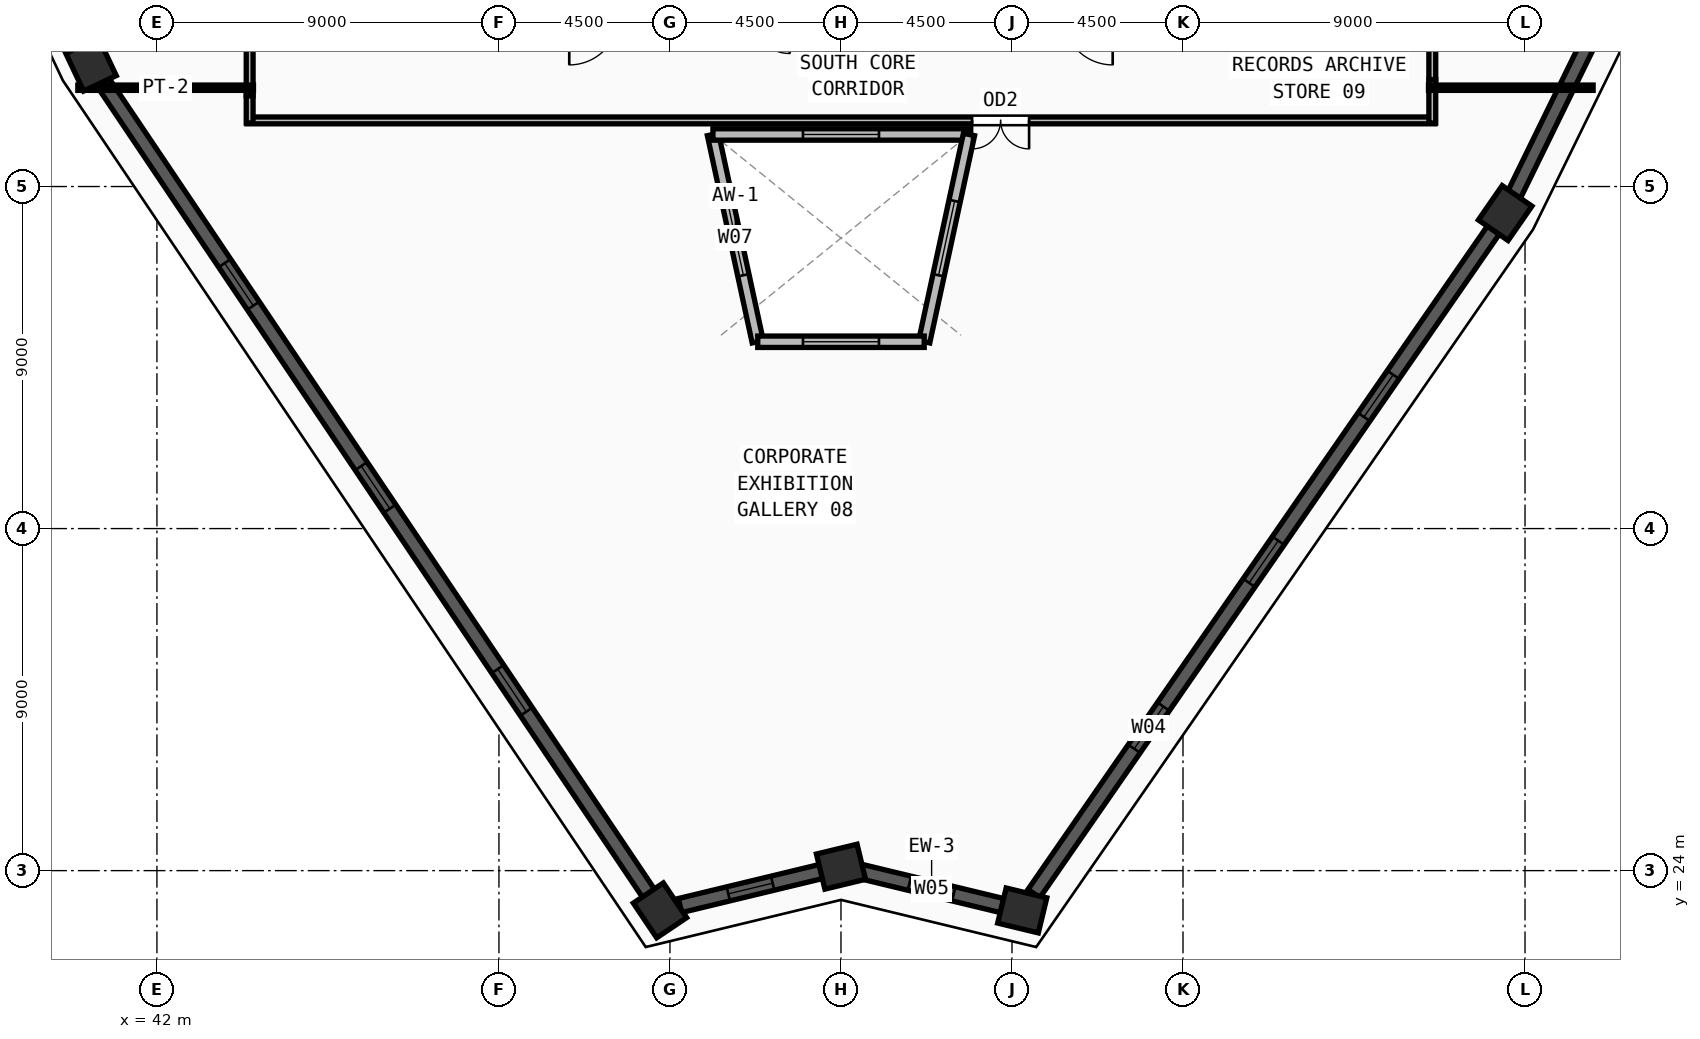
"""IFC4 building model, lengths in metres.
Left out: names, types, materials, properties, quantities, classifications, styles, units other than length and angle.
Written with IfcOpenShell. Run it as: python <this file> out.ifc"""

import sys

from ifc_helpers import new_model, si_unit, direction, frame, frame_2d, origin, origin_2d, place, context, subcontext, project, spatial, rectangle, extrude, source, transform, mapped, element, fill, save


model = new_model("IFC4")
c1 = context("Model", 3, precision=1e-05, world=origin(), true_north=direction((0.0, 1.0)))
c2 = subcontext(c1, "Body", "Model", "MODEL_VIEW")
j1 = project(units=[si_unit("LENGTHUNIT", "METRE"), si_unit("PLANEANGLEUNIT", "RADIAN")], contexts=[c1])
p1 = place(None, origin())
s1 = spatial("IfcSite", under=j1, at=p1, CompositionType="ELEMENT")
p2 = place(p1, origin())
s2 = spatial("IfcBuilding", under=s1, at=p2, CompositionType="ELEMENT")
p3 = place(p2, frame((0.0, 0.0, 328.5)))
s3 = spatial("IfcBuildingStorey", under=s2, at=p3, CompositionType="ELEMENT", Elevation=328.5)
m1 = source(origin(), c2, "Body", "SweptSolid", [
    extrude(rectangle(XDim=1.1, YDim=0.95, at=origin_2d()), origin(), (0.0, 0.0, 1.0), 3.75),
])
for number, where, z_axis, x_axis in (
    (1, (55.238, 22.954, 0.0), (0.0, 0.0, 1.0), (-0.558, 0.83, 0.0)),
    (2, (40.265, 45.213, 0.0), (0.0, 0.0, 1.0), (-0.427, 0.904, 0.0)),
    (3, (77.477, 41.302, 0.0), (0.0, 0.0, 1.0), (0.569, 0.822, 0.0)),
    (4, (64.77, 22.952, 0.0), (0.0, 0.0, 1.0), (-0.972, 0.235, 0.0)),
    (5, (60.0, 24.104, 0.0), (0.0, 0.0, 1.0), (0.972, 0.235, 0.0)),
):
    element("IfcColumn", number, at=place(p3, frame(where, z_axis=z_axis, x_axis=x_axis)), inside=s3, PredefinedType="COLUMN", context=c2, shape_type="MappedRepresentation", body=[
        mapped(m1, transform((0.0, 0.0, 0.0), x_axis=(1.0, 0.0, 0.0), y_axis=(0.0, 1.0, 0.0), z_axis=(0.0, 0.0, 1.0), scale=1.0)),
    ])
p4 = place(p3, frame((60.525, 23.977, 0.0), z_axis=(0.0, 0.0, 1.0), x_axis=(0.972084215522, -0.234632218447, 0.0)))
e6 = element("IfcWall", 6, at=p4, inside=s3, PredefinedType="SOLIDWALL", context=c2, shape_type="SweptSolid", body=[
    extrude(rectangle(XDim=3.827, YDim=0.38, at=frame_2d((1.914, 0.0))), origin(), (0.0, 0.0, 1.0), 3.57),
])
m2 = source(origin(), c2, "Body", "SweptSolid", [
    extrude(rectangle(XDim=1.2, YDim=1.9, at=frame_2d((0.6, 0.95))), frame((0.0, 0.2, 0.0), z_axis=(0.0, -1.0, 0.0), x_axis=(1.0, 0.0, 0.0)), (0.0, 0.0, 1.0), 0.4),
])
p5 = place(p4, frame((1.313, 0.0, 0.55)))
e7 = element("IfcOpeningElement", 7, at=p5, cuts=e6, PredefinedType="OPENING", context=c2, shape_type="MappedRepresentation", body=[
    mapped(m2, transform((0.0, 0.0, 0.0), x_axis=(1.0, 0.0, 0.0), y_axis=(0.0, 1.0, 0.0), z_axis=(0.0, 0.0, 1.0), scale=1.0)),
])
p6 = place(p3, frame((65.077, 23.396, 0.0), z_axis=(0.0, 0.0, 1.0), x_axis=(0.569337280664, 0.822104045025, 0.0)))
e8 = element("IfcWall", 8, at=p6, inside=s3, PredefinedType="SOLIDWALL", context=c2, shape_type="SweptSolid", body=[
    extrude(rectangle(XDim=21.24, YDim=0.38, at=frame_2d((10.62, 0.0))), origin(), (0.0, 0.0, 1.0), 3.57),
])
m3 = source(origin(), c2, "Body", "SweptSolid", [
    extrude(rectangle(XDim=1.35, YDim=1.85, at=frame_2d((0.675, 0.925))), frame((0.0, 0.2, 0.0), z_axis=(0.0, -1.0, 0.0), x_axis=(1.0, 0.0, 0.0)), (0.0, 0.0, 1.0), 0.4),
])
p7 = place(p6, frame((4.635, 0.0, 0.55)))
e9 = element("IfcOpeningElement", 9, at=p7, cuts=e8, PredefinedType="OPENING", context=c2, shape_type="MappedRepresentation", body=[
    mapped(m3, transform((0.0, 0.0, 0.0), x_axis=(1.0, 0.0, 0.0), y_axis=(0.0, 1.0, 0.0), z_axis=(0.0, 0.0, 1.0), scale=1.0)),
])
p8 = place(p6, frame((9.945, 0.0, 0.55)))
e10 = element("IfcOpeningElement", 10, at=p8, cuts=e8, PredefinedType="OPENING", context=c2, shape_type="MappedRepresentation", body=[
    mapped(m3, transform((0.0, 0.0, 0.0), x_axis=(1.0, 0.0, 0.0), y_axis=(0.0, 1.0, 0.0), z_axis=(0.0, 0.0, 1.0), scale=1.0)),
])
p9 = place(p6, frame((15.255, 0.0, 0.55)))
e11 = element("IfcOpeningElement", 11, at=p9, cuts=e8, PredefinedType="OPENING", context=c2, shape_type="MappedRepresentation", body=[
    mapped(m3, transform((0.0, 0.0, 0.0), x_axis=(1.0, 0.0, 0.0), y_axis=(0.0, 1.0, 0.0), z_axis=(0.0, 0.0, 1.0), scale=1.0)),
])
p10 = place(p3, frame((77.714, 41.787, 0.0), z_axis=(0.0, 0.0, 1.0), x_axis=(0.439535610403, 0.898225165083, 0.0)))
e12 = element("IfcWall", 12, at=p10, inside=s3, PredefinedType="SOLIDWALL", context=c2, shape_type="SweptSolid", body=[
    extrude(rectangle(XDim=25.747, YDim=0.38, at=frame_2d((12.874, 0.0))), origin(), (0.0, 0.0, 1.0), 3.57),
])
p11 = place(p10, frame((4.912, 0.0, 0.55)))
e13 = element("IfcOpeningElement", 13, at=p11, cuts=e12, PredefinedType="OPENING", context=c2, shape_type="MappedRepresentation", body=[
    mapped(m3, transform((0.0, 0.0, 0.0), x_axis=(1.0, 0.0, 0.0), y_axis=(0.0, 1.0, 0.0), z_axis=(0.0, 0.0, 1.0), scale=1.0)),
])
p12 = place(p10, frame((12.199, 0.0, 0.55)))
e14 = element("IfcOpeningElement", 14, at=p12, cuts=e12, PredefinedType="OPENING", context=c2, shape_type="MappedRepresentation", body=[
    mapped(m3, transform((0.0, 0.0, 0.0), x_axis=(1.0, 0.0, 0.0), y_axis=(0.0, 1.0, 0.0), z_axis=(0.0, 0.0, 1.0), scale=1.0)),
])
p13 = place(p10, frame((18.636, 0.0, 0.55)))
e15 = element("IfcOpeningElement", 15, at=p13, cuts=e12, PredefinedType="OPENING", context=c2, shape_type="MappedRepresentation", body=[
    mapped(m3, transform((0.0, 0.0, 0.0), x_axis=(1.0, 0.0, 0.0), y_axis=(0.0, 1.0, 0.0), z_axis=(0.0, 0.0, 1.0), scale=1.0)),
])
p14 = place(p3, frame((40.566, 44.765, 0.0), z_axis=(0.0, 0.0, 1.0), x_axis=(0.558170282959, -0.829726421913, 0.0)))
e16 = element("IfcWall", 16, at=p14, inside=s3, PredefinedType="SOLIDWALL", context=c2, shape_type="SweptSolid", body=[
    extrude(rectangle(XDim=25.747, YDim=0.38, at=frame_2d((12.874, 0.0))), origin(), (0.0, 0.0, 1.0), 3.57),
])
p15 = place(p14, frame((5.762, 0.0, 0.55)))
e17 = element("IfcOpeningElement", 17, at=p15, cuts=e16, PredefinedType="OPENING", context=c2, shape_type="MappedRepresentation", body=[
    mapped(m3, transform((0.0, 0.0, 0.0), x_axis=(1.0, 0.0, 0.0), y_axis=(0.0, 1.0, 0.0), z_axis=(0.0, 0.0, 1.0), scale=1.0)),
])
p16 = place(p14, frame((12.198, 0.0, 0.55)))
e18 = element("IfcOpeningElement", 18, at=p16, cuts=e16, PredefinedType="OPENING", context=c2, shape_type="MappedRepresentation", body=[
    mapped(m3, transform((0.0, 0.0, 0.0), x_axis=(1.0, 0.0, 0.0), y_axis=(0.0, 1.0, 0.0), z_axis=(0.0, 0.0, 1.0), scale=1.0)),
])
p17 = place(p14, frame((18.635, 0.0, 0.55)))
e19 = element("IfcOpeningElement", 19, at=p17, cuts=e16, PredefinedType="OPENING", context=c2, shape_type="MappedRepresentation", body=[
    mapped(m3, transform((0.0, 0.0, 0.0), x_axis=(1.0, 0.0, 0.0), y_axis=(0.0, 1.0, 0.0), z_axis=(0.0, 0.0, 1.0), scale=1.0)),
])
p18 = place(p3, frame((55.763, 23.081, 0.0), z_axis=(0.0, 0.0, 1.0), x_axis=(0.972084722694, 0.234630117217, 0.0)))
e20 = element("IfcWall", 20, at=p18, inside=s3, PredefinedType="SOLIDWALL", context=c2, shape_type="SweptSolid", body=[
    extrude(rectangle(XDim=3.819, YDim=0.38, at=frame_2d((1.909, 0.0))), origin(), (0.0, 0.0, 1.0), 3.57),
])
p19 = place(p18, frame((1.309, 0.0, 0.55)))
e21 = element("IfcOpeningElement", 21, at=p19, cuts=e20, PredefinedType="OPENING", context=c2, shape_type="MappedRepresentation", body=[
    mapped(m2, transform((0.0, 0.0, 0.0), x_axis=(1.0, 0.0, 0.0), y_axis=(0.0, 1.0, 0.0), z_axis=(0.0, 0.0, 1.0), scale=1.0)),
])
p20 = place(p3, frame((57.81, 37.916, 0.0), z_axis=(0.0, 0.0, 1.0), x_axis=(-0.211279697176, 0.977425644006, 0.0)))
e22 = element("IfcWall", 22, at=p20, inside=s3, PredefinedType="SOLIDWALL", context=c2, shape_type="SweptSolid", body=[
    extrude(rectangle(XDim=5.58, YDim=0.3, at=frame_2d((2.79, 0.0))), origin(), (0.0, 0.0, 1.0), 3.57),
])
m4 = source(origin(), c2, "Body", "SweptSolid", [
    extrude(rectangle(XDim=2.0, YDim=1.9, at=frame_2d((1.0, 0.95))), frame((0.0, 0.16, 0.0), z_axis=(0.0, -1.0, 0.0), x_axis=(1.0, 0.0, 0.0)), (0.0, 0.0, 1.0), 0.32),
])
p21 = place(p20, frame((1.79, 0.0, 0.55)))
e23 = element("IfcOpeningElement", 23, at=p21, cuts=e22, PredefinedType="OPENING", context=c2, shape_type="MappedRepresentation", body=[
    mapped(m4, transform((0.0, 0.0, 0.0), x_axis=(1.0, 0.0, 0.0), y_axis=(0.0, 1.0, 0.0), z_axis=(0.0, 0.0, 1.0), scale=1.0)),
])
p22 = place(p3, frame((56.631, 43.37, 0.0), z_axis=(0.0, 0.0, 1.0), x_axis=(1.0, 0.0, 0.0)))
e24 = element("IfcWall", 24, at=p22, inside=s3, PredefinedType="SOLIDWALL", context=c2, shape_type="SweptSolid", body=[
    extrude(rectangle(XDim=6.738, YDim=0.3, at=frame_2d((3.369, 0.0))), origin(), (0.0, 0.0, 1.0), 3.57),
])
p23 = place(p22, frame((2.369, 0.0, 0.55)))
e25 = element("IfcOpeningElement", 25, at=p23, cuts=e24, PredefinedType="OPENING", context=c2, shape_type="MappedRepresentation", body=[
    mapped(m4, transform((0.0, 0.0, 0.0), x_axis=(1.0, 0.0, 0.0), y_axis=(0.0, 1.0, 0.0), z_axis=(0.0, 0.0, 1.0), scale=1.0)),
])
p24 = place(p3, frame((63.369, 43.37, 0.0), z_axis=(0.0, 0.0, 1.0), x_axis=(-0.211279697176, -0.977425644006, 0.0)))
e26 = element("IfcWall", 26, at=p24, inside=s3, PredefinedType="SOLIDWALL", context=c2, shape_type="SweptSolid", body=[
    extrude(rectangle(XDim=5.58, YDim=0.3, at=frame_2d((2.79, 0.0))), origin(), (0.0, 0.0, 1.0), 3.57),
])
p25 = place(p24, frame((1.79, 0.0, 0.55)))
e27 = element("IfcOpeningElement", 27, at=p25, cuts=e26, PredefinedType="OPENING", context=c2, shape_type="MappedRepresentation", body=[
    mapped(m4, transform((0.0, 0.0, 0.0), x_axis=(1.0, 0.0, 0.0), y_axis=(0.0, 1.0, 0.0), z_axis=(0.0, 0.0, 1.0), scale=1.0)),
])
p26 = place(p3, frame((62.19, 37.916, 0.0), z_axis=(0.0, 0.0, 1.0), x_axis=(-1.0, 0.0, 0.0)))
e28 = element("IfcWall", 28, at=p26, inside=s3, PredefinedType="SOLIDWALL", context=c2, shape_type="SweptSolid", body=[
    extrude(rectangle(XDim=4.38, YDim=0.3, at=frame_2d((2.19, 0.0))), origin(), (0.0, 0.0, 1.0), 3.57),
])
p27 = place(p26, frame((1.19, 0.0, 0.55)))
e29 = element("IfcOpeningElement", 29, at=p27, cuts=e28, PredefinedType="OPENING", context=c2, shape_type="MappedRepresentation", body=[
    mapped(m4, transform((0.0, 0.0, 0.0), x_axis=(1.0, 0.0, 0.0), y_axis=(0.0, 1.0, 0.0), z_axis=(0.0, 0.0, 1.0), scale=1.0)),
])
p28 = place(p3, frame((75.63, 43.74, 0.0), z_axis=(0.0, 0.0, 1.0), x_axis=(-1.0, 0.0, 0.0)))
e30 = element("IfcWall", 30, at=p28, inside=s3, PredefinedType="PARTITIONING", context=c2, shape_type="SweptSolid", body=[
    extrude(rectangle(XDim=31.26, YDim=0.18, at=frame_2d((15.63, 0.0))), origin(), (0.0, 0.0, 1.0), 3.57),
])
m5 = source(origin(), c2, "Body", "SweptSolid", [
    extrude(rectangle(XDim=1.5, YDim=2.2, at=frame_2d((0.75, 1.1))), frame((0.0, 0.1, 0.0), z_axis=(0.0, -1.0, 0.0), x_axis=(1.0, 0.0, 0.0)), (0.0, 0.0, 1.0), 0.2),
])
p29 = place(p28, frame((10.68, 0.0, 0.0)))
e31 = element("IfcOpeningElement", 31, at=p29, cuts=e30, PredefinedType="OPENING", context=c2, shape_type="MappedRepresentation", body=[
    mapped(m5, transform((0.0, 0.0, 0.0), x_axis=(1.0, 0.0, 0.0), y_axis=(0.0, 1.0, 0.0), z_axis=(0.0, 0.0, 1.0), scale=1.0)),
])
p30 = place(p3, frame((44.44, 44.385, 0.0), z_axis=(0.0, 0.0, 1.0), x_axis=(0.0, 1.0, 0.0)))
e32 = element("IfcWall", 32, at=p30, inside=s3, PredefinedType="PARTITIONING", context=c2, shape_type="SweptSolid", body=[
    extrude(rectangle(XDim=2.955, YDim=0.18, at=frame_2d((1.478, 0.0))), origin(), (0.0, 0.0, 1.0), 3.57),
])
p31 = place(p3, frame((44.44, 43.67, 0.0), z_axis=(0.0, 0.0, 1.0), x_axis=(0.0, 1.0, 0.0)))
e33 = element("IfcWall", 33, at=p31, inside=s3, PredefinedType="PARTITIONING", context=c2, shape_type="SweptSolid", body=[
    extrude(rectangle(XDim=0.715, YDim=0.18, at=frame_2d((0.357, 0.0))), origin(), (0.0, 0.0, 1.0), 3.57),
])
p32 = place(p3, frame((75.56, 44.815, 0.0), z_axis=(0.0, 0.0, 1.0), x_axis=(0.0, -1.0, 0.0)))
e34 = element("IfcWall", 34, at=p32, inside=s3, PredefinedType="PARTITIONING", context=c2, shape_type="SweptSolid", body=[
    extrude(rectangle(XDim=1.145, YDim=0.18, at=frame_2d((0.573, 0.0))), origin(), (0.0, 0.0, 1.0), 3.57),
])
p33 = place(p3, frame((75.56, 48.21, 0.0), z_axis=(0.0, 0.0, 1.0), x_axis=(0.0, -1.0, 0.0)))
e35 = element("IfcWall", 35, at=p33, inside=s3, PredefinedType="PARTITIONING", context=c2, shape_type="SweptSolid", body=[
    extrude(rectangle(XDim=3.395, YDim=0.18, at=frame_2d((1.698, 0.0))), origin(), (0.0, 0.0, 1.0), 3.57),
])
p34 = place(p3, frame((44.54, 44.6, 0.0), z_axis=(0.0, 0.0, 1.0), x_axis=(-1.0, 0.0, 0.0)))
e36 = element("IfcWall", 36, at=p34, inside=s3, PredefinedType="PARTITIONING", context=c2, shape_type="SweptSolid", body=[
    extrude(rectangle(XDim=4.622, YDim=0.14, at=frame_2d((2.311, 0.0))), origin(), (0.0, 0.0, 1.0), 3.57),
])
p35 = place(p3, frame((75.46, 44.6, 0.0), z_axis=(0.0, 0.0, 1.0), x_axis=(1.0, 0.0, 0.0)))
e37 = element("IfcWall", 37, at=p35, inside=s3, PredefinedType="PARTITIONING", context=c2, shape_type="SweptSolid", body=[
    extrude(rectangle(XDim=4.332, YDim=0.14, at=frame_2d((2.166, 0.0))), origin(), (0.0, 0.0, 1.0), 3.57),
])
m6 = source(origin(), c2, "Body", "SweptSolid", [
    extrude(rectangle(XDim=1.2, YDim=1.9, at=frame_2d((0.6, 0.95))), frame((0.0, 0.03, 0.0), z_axis=(0.0, -1.0, 0.0), x_axis=(1.0, 0.0, 0.0)), (0.0, 0.0, 1.0), 0.06),
])
p36 = place(p5, origin())
e38 = element("IfcWindow", 38, at=p36, inside=s3, PartitioningType="SINGLE_PANEL", PredefinedType="WINDOW", context=c2, shape_type="MappedRepresentation", body=[
    mapped(m6, transform((0.0, 0.0, 0.0), x_axis=(1.0, 0.0, 0.0), y_axis=(0.0, 1.0, 0.0), z_axis=(0.0, 0.0, 1.0), scale=1.0)),
])
fill(e7, e38)
m7 = source(origin(), c2, "Body", "SweptSolid", [
    extrude(rectangle(XDim=1.35, YDim=1.85, at=frame_2d((0.675, 0.925))), frame((0.0, 0.03, 0.0), z_axis=(0.0, -1.0, 0.0), x_axis=(1.0, 0.0, 0.0)), (0.0, 0.0, 1.0), 0.06),
])
p37 = place(p7, origin())
e39 = element("IfcWindow", 39, at=p37, inside=s3, PartitioningType="SINGLE_PANEL", PredefinedType="WINDOW", context=c2, shape_type="MappedRepresentation", body=[
    mapped(m7, transform((0.0, 0.0, 0.0), x_axis=(1.0, 0.0, 0.0), y_axis=(0.0, 1.0, 0.0), z_axis=(0.0, 0.0, 1.0), scale=1.0)),
])
fill(e9, e39)
p38 = place(p8, origin())
e40 = element("IfcWindow", 40, at=p38, inside=s3, PartitioningType="SINGLE_PANEL", PredefinedType="WINDOW", context=c2, shape_type="MappedRepresentation", body=[
    mapped(m7, transform((0.0, 0.0, 0.0), x_axis=(1.0, 0.0, 0.0), y_axis=(0.0, 1.0, 0.0), z_axis=(0.0, 0.0, 1.0), scale=1.0)),
])
fill(e10, e40)
p39 = place(p9, origin())
e41 = element("IfcWindow", 41, at=p39, inside=s3, PartitioningType="SINGLE_PANEL", PredefinedType="WINDOW", context=c2, shape_type="MappedRepresentation", body=[
    mapped(m7, transform((0.0, 0.0, 0.0), x_axis=(1.0, 0.0, 0.0), y_axis=(0.0, 1.0, 0.0), z_axis=(0.0, 0.0, 1.0), scale=1.0)),
])
fill(e11, e41)
p40 = place(p15, origin())
e42 = element("IfcWindow", 42, at=p40, inside=s3, PartitioningType="SINGLE_PANEL", PredefinedType="WINDOW", context=c2, shape_type="MappedRepresentation", body=[
    mapped(m7, transform((0.0, 0.0, 0.0), x_axis=(1.0, 0.0, 0.0), y_axis=(0.0, 1.0, 0.0), z_axis=(0.0, 0.0, 1.0), scale=1.0)),
])
fill(e17, e42)
p41 = place(p16, origin())
e43 = element("IfcWindow", 43, at=p41, inside=s3, PartitioningType="SINGLE_PANEL", PredefinedType="WINDOW", context=c2, shape_type="MappedRepresentation", body=[
    mapped(m7, transform((0.0, 0.0, 0.0), x_axis=(1.0, 0.0, 0.0), y_axis=(0.0, 1.0, 0.0), z_axis=(0.0, 0.0, 1.0), scale=1.0)),
])
fill(e18, e43)
p42 = place(p17, origin())
e44 = element("IfcWindow", 44, at=p42, inside=s3, PartitioningType="SINGLE_PANEL", PredefinedType="WINDOW", context=c2, shape_type="MappedRepresentation", body=[
    mapped(m7, transform((0.0, 0.0, 0.0), x_axis=(1.0, 0.0, 0.0), y_axis=(0.0, 1.0, 0.0), z_axis=(0.0, 0.0, 1.0), scale=1.0)),
])
fill(e19, e44)
p43 = place(p19, origin())
e45 = element("IfcWindow", 45, at=p43, inside=s3, PartitioningType="SINGLE_PANEL", PredefinedType="WINDOW", context=c2, shape_type="MappedRepresentation", body=[
    mapped(m6, transform((0.0, 0.0, 0.0), x_axis=(1.0, 0.0, 0.0), y_axis=(0.0, 1.0, 0.0), z_axis=(0.0, 0.0, 1.0), scale=1.0)),
])
fill(e21, e45)
m8 = source(origin(), c2, "Body", "SweptSolid", [
    extrude(rectangle(XDim=2.0, YDim=1.9, at=frame_2d((1.0, 0.95))), frame((0.0, 0.03, 0.0), z_axis=(0.0, -1.0, 0.0), x_axis=(1.0, 0.0, 0.0)), (0.0, 0.0, 1.0), 0.06),
])
p44 = place(p21, origin())
e46 = element("IfcWindow", 46, at=p44, inside=s3, PartitioningType="DOUBLE_PANEL_VERTICAL", PredefinedType="WINDOW", context=c2, shape_type="MappedRepresentation", body=[
    mapped(m8, transform((0.0, 0.0, 0.0), x_axis=(1.0, 0.0, 0.0), y_axis=(0.0, 1.0, 0.0), z_axis=(0.0, 0.0, 1.0), scale=1.0)),
])
fill(e23, e46)
p45 = place(p23, origin())
e47 = element("IfcWindow", 47, at=p45, inside=s3, PartitioningType="DOUBLE_PANEL_VERTICAL", PredefinedType="WINDOW", context=c2, shape_type="MappedRepresentation", body=[
    mapped(m8, transform((0.0, 0.0, 0.0), x_axis=(1.0, 0.0, 0.0), y_axis=(0.0, 1.0, 0.0), z_axis=(0.0, 0.0, 1.0), scale=1.0)),
])
fill(e25, e47)
p46 = place(p25, origin())
e48 = element("IfcWindow", 48, at=p46, inside=s3, PartitioningType="DOUBLE_PANEL_VERTICAL", PredefinedType="WINDOW", context=c2, shape_type="MappedRepresentation", body=[
    mapped(m8, transform((0.0, 0.0, 0.0), x_axis=(1.0, 0.0, 0.0), y_axis=(0.0, 1.0, 0.0), z_axis=(0.0, 0.0, 1.0), scale=1.0)),
])
fill(e27, e48)
p47 = place(p27, origin())
e49 = element("IfcWindow", 49, at=p47, inside=s3, PartitioningType="DOUBLE_PANEL_VERTICAL", PredefinedType="WINDOW", context=c2, shape_type="MappedRepresentation", body=[
    mapped(m8, transform((0.0, 0.0, 0.0), x_axis=(1.0, 0.0, 0.0), y_axis=(0.0, 1.0, 0.0), z_axis=(0.0, 0.0, 1.0), scale=1.0)),
])
fill(e29, e49)
m9 = source(origin(), c2, "Body", "SweptSolid", [
    extrude(rectangle(XDim=1.5, YDim=2.2, at=frame_2d((0.75, 1.1))), frame((0.0, 0.025, 0.0), z_axis=(0.0, -1.0, 0.0), x_axis=(1.0, 0.0, 0.0)), (0.0, 0.0, 1.0), 0.05),
])
p48 = place(p29, origin())
e50 = element("IfcDoor", 50, at=p48, inside=s3, OperationType="DOUBLE_DOOR_SINGLE_SWING", PredefinedType="DOOR", context=c2, shape_type="MappedRepresentation", body=[
    mapped(m9, transform((0.0, 0.0, 0.0), x_axis=(1.0, 0.0, 0.0), y_axis=(0.0, 1.0, 0.0), z_axis=(0.0, 0.0, 1.0), scale=1.0)),
])
fill(e31, e50)
save(model, sys.argv[1])
